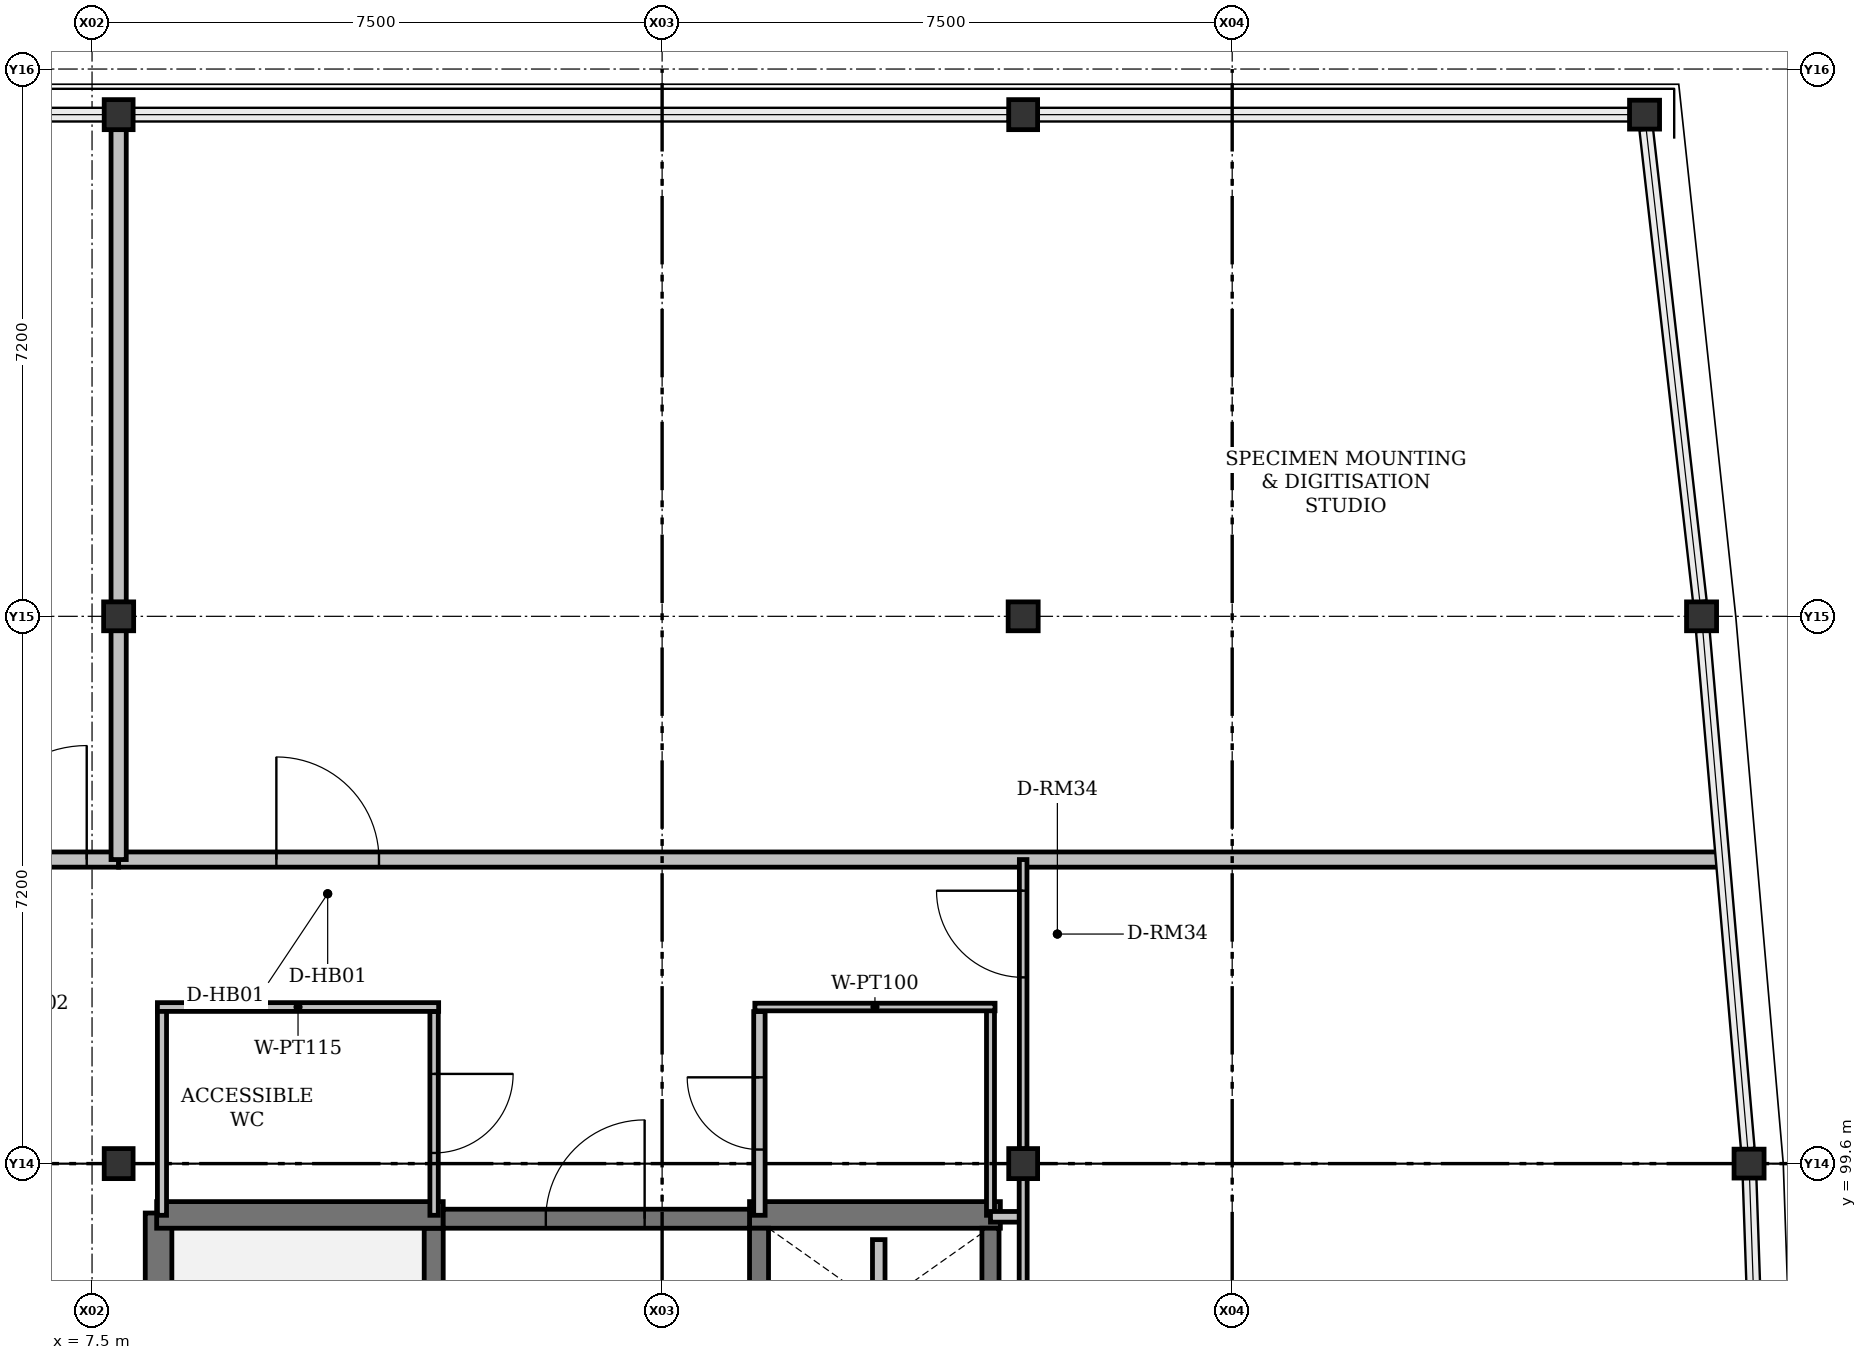
"""IFC4 building model, lengths in metres.
Left out: names, types, materials, properties, quantities, classifications, styles, units other than length and angle.
Written with IfcOpenShell. Run it as: python <this file> out.ifc"""

import sys

from ifc_helpers import new_model, si_unit, direction, frame, frame_2d, origin, origin_2d, place, context, subcontext, project, spatial, rectangle, i_section, extrude, element, fill, save


model = new_model("IFC4")
c1 = context("Model", 3, precision=1e-05, world=origin(), true_north=direction((0.0, 1.0)))
c2 = subcontext(c1, "Body", "Model", "MODEL_VIEW")
j1 = project(units=[si_unit("LENGTHUNIT", "METRE"), si_unit("PLANEANGLEUNIT", "RADIAN")], contexts=[c1])
p1 = place(None, origin())
s1 = spatial("IfcSite", under=j1, at=p1, CompositionType="ELEMENT")
p2 = place(p1, origin())
s2 = spatial("IfcBuilding", under=s1, at=p2, CompositionType="ELEMENT")
p3 = place(p2, frame((0.0, 0.0, 9.9)))
s3 = spatial("IfcBuildingStorey", under=s2, at=p3, CompositionType="ELEMENT", Elevation=9.9)
for number, where, z_axis, x_axis in (
    (1, (7.85, 99.6, 0.0), (0.0, 0.0, 1.0), (0.0, 1.0, 0.0)),
    (2, (19.75, 99.6, 0.0), (0.0, 0.0, 1.0), (0.0, 1.0, 0.0)),
    (3, (29.3, 99.6, 0.0), (0.0, 0.0, 1.0), (1.0, 0.0, 0.0)),
    (4, (7.85, 106.8, 0.0), (0.0, 0.0, 1.0), (1.0, 0.0, 0.0)),
    (5, (19.75, 106.8, 0.0), (0.0, 0.0, 1.0), (1.0, 0.0, 0.0)),
    (6, (28.675, 106.8, 0.0), (0.0, 0.0, 1.0), (1.0, 0.0, 0.0)),
    (7, (7.85, 113.4, 0.0), (0.0, 0.0, 1.0), (0.0, 1.0, 0.0)),
    (8, (19.75, 113.4, 0.0), (0.0, 0.0, 1.0), (0.0, 1.0, 0.0)),
    (9, (27.925, 113.4, 0.0), (0.0, 0.0, 1.0), (1.0, 0.0, 0.0)),
):
    element("IfcColumn", number, at=place(p3, frame(where, z_axis=z_axis, x_axis=x_axis)), inside=s3, PredefinedType="COLUMN", context=c2, shape_type="SweptSolid", body=[
        extrude(i_section(OverallWidth=0.395, OverallDepth=0.38, WebThickness=0.019, FlangeThickness=0.03, FilletRadius=0.015, at=origin_2d()), origin(), (0.0, 0.0, 1.0), 4.2),
    ])
p4 = place(p3, frame((8.375, 90.775, 0.0), z_axis=(0.0, 0.0, 1.0), x_axis=(0.0, 1.0, 0.0)))
e10 = element("IfcWall", 10, at=p4, inside=s3, PredefinedType="SHEAR", context=c2, shape_type="SweptSolid", body=[
    extrude(rectangle(XDim=8.175, YDim=0.35, at=frame_2d((4.087, 0.0))), origin(), (0.0, 0.0, 1.0), 4.2),
])
p5 = place(p3, frame((11.995, 90.9, 0.0), z_axis=(0.0, 0.0, 1.0), x_axis=(0.0, 1.0, 0.0)))
e11 = element("IfcWall", 11, at=p5, inside=s3, PredefinedType="SHEAR", context=c2, shape_type="SweptSolid", body=[
    extrude(rectangle(XDim=7.85, YDim=0.25, at=frame_2d((3.925, 0.0))), origin(), (0.0, 0.0, 1.0), 4.2),
])
p6 = place(p3, frame((8.35, 98.925, 0.0), z_axis=(0.0, 0.0, 1.0), x_axis=(1.0, 0.0, 0.0)))
e12 = element("IfcWall", 12, at=p6, inside=s3, PredefinedType="SHEAR", context=c2, shape_type="SweptSolid", body=[
    extrude(rectangle(XDim=3.77, YDim=0.35, at=frame_2d((1.885, 0.0))), origin(), (0.0, 0.0, 1.0), 4.2),
])
p7 = place(p3, frame((16.15, 98.925, 0.0), z_axis=(0.0, 0.0, 1.0), x_axis=(1.0, 0.0, 0.0)))
e13 = element("IfcWall", 13, at=p7, inside=s3, PredefinedType="SHEAR", context=c2, shape_type="SweptSolid", body=[
    extrude(rectangle(XDim=3.3, YDim=0.35, at=frame_2d((1.65, 0.0))), origin(), (0.0, 0.0, 1.0), 4.2),
])
p8 = place(p3, frame((12.12, 98.875, 0.0), z_axis=(0.0, 0.0, 1.0), x_axis=(1.0, 0.0, 0.0)))
e14 = element("IfcWall", 14, at=p8, inside=s3, PredefinedType="SHEAR", context=c2, shape_type="SweptSolid", body=[
    extrude(rectangle(XDim=4.03, YDim=0.25, at=frame_2d((2.015, 0.0))), origin(), (0.0, 0.0, 1.0), 4.2),
])
p9 = place(p8, frame((1.35, 0.0, 0.0)))
e15 = element("IfcOpeningElement", 15, at=p9, cuts=e14, PredefinedType="OPENING", context=c2, shape_type="SweptSolid", body=[
    extrude(rectangle(XDim=1.3, YDim=2.2, at=frame_2d((0.65, 1.1))), frame((0.0, 0.125, 0.0), z_axis=(0.0, -1.0, 0.0), x_axis=(1.0, 0.0, 0.0)), (0.0, 0.0, 1.0), 0.25),
])
p10 = place(p3, frame((19.32, 84.8, 0.0), z_axis=(0.0, 0.0, 1.0), x_axis=(0.0, 1.0, 0.0)))
e16 = element("IfcWall", 16, at=p10, inside=s3, PredefinedType="SHEAR", context=c2, shape_type="SweptSolid", body=[
    extrude(rectangle(XDim=13.95, YDim=0.225, at=frame_2d((6.975, 0.0))), origin(), (0.0, 0.0, 1.0), 4.2),
])
p11 = place(p3, frame((16.275, 96.575, 0.0), z_axis=(0.0, 0.0, 1.0), x_axis=(0.0, 1.0, 0.0)))
e17 = element("IfcWall", 17, at=p11, inside=s3, PredefinedType="SHEAR", context=c2, shape_type="SweptSolid", body=[
    extrude(rectangle(XDim=2.175, YDim=0.25, at=frame_2d((1.087, 0.0))), origin(), (0.0, 0.0, 1.0), 4.2),
])
p12 = place(p3, frame((17.85, 96.8, 0.0), z_axis=(0.0, 0.0, 1.0), x_axis=(0.0, 1.0, 0.0)))
e18 = element("IfcWall", 18, at=p12, inside=s3, PredefinedType="PLUMBINGWALL", context=c2, shape_type="SweptSolid", body=[
    extrude(rectangle(XDim=1.8, YDim=0.165, at=frame_2d((0.9, 0.0))), origin(), (0.0, 0.0, 1.0), 4.2),
])
p13 = place(p3, frame((8.42, 98.92, 0.0), z_axis=(0.0, 0.0, 1.0), x_axis=(0.0, 1.0, 0.0)))
e19 = element("IfcWall", 19, at=p13, inside=s3, PredefinedType="PARTITIONING", context=c2, shape_type="SweptSolid", body=[
    extrude(rectangle(XDim=2.74, YDim=0.12, at=frame_2d((1.37, 0.0))), origin(), (0.0, 0.0, 1.0), 3.466),
])
p14 = place(p3, frame((8.36, 101.66, 0.0), z_axis=(0.0, 0.0, 1.0), x_axis=(1.0, 0.0, 0.0)))
e20 = element("IfcWall", 20, at=p14, inside=s3, PredefinedType="PARTITIONING", context=c2, shape_type="SweptSolid", body=[
    extrude(rectangle(XDim=3.7, YDim=0.115, at=frame_2d((1.85, 0.0))), origin(), (0.0, 0.0, 1.0), 3.95),
])
p15 = place(p3, frame((12.0, 101.6, 0.0), z_axis=(0.0, 0.0, 1.0), x_axis=(0.0, -1.0, 0.0)))
e21 = element("IfcWall", 21, at=p15, inside=s3, PredefinedType="PARTITIONING", context=c2, shape_type="SweptSolid", body=[
    extrude(rectangle(XDim=2.68, YDim=0.11, at=frame_2d((1.34, 0.0))), origin(), (0.0, 0.0, 1.0), 3.466),
])
p16 = place(p15, frame((0.82, 0.0, 0.0)))
e22 = element("IfcOpeningElement", 22, at=p16, cuts=e21, PredefinedType="OPENING", context=c2, shape_type="SweptSolid", body=[
    extrude(rectangle(XDim=1.04, YDim=2.15, at=frame_2d((0.52, 1.075))), frame((0.0, 0.055, 0.0), z_axis=(0.0, -1.0, 0.0), x_axis=(1.0, 0.0, 0.0)), (0.0, 0.0, 1.0), 0.11),
])
p17 = place(p3, frame((19.32, 98.92, 0.0), z_axis=(0.0, 0.0, 1.0), x_axis=(0.0, 1.0, 0.0)))
e23 = element("IfcWall", 23, at=p17, inside=s3, PredefinedType="PARTITIONING", context=c2, shape_type="SweptSolid", body=[
    extrude(rectangle(XDim=2.74, YDim=0.105, at=frame_2d((1.37, 0.0))), origin(), (0.0, 0.0, 1.0), 3.466),
])
p18 = place(p3, frame((19.38, 101.66, 0.0), z_axis=(0.0, 0.0, 1.0), x_axis=(-1.0, 0.0, 0.0)))
e24 = element("IfcWall", 24, at=p18, inside=s3, PredefinedType="PARTITIONING", context=c2, shape_type="SweptSolid", body=[
    extrude(rectangle(XDim=3.16, YDim=0.1, at=frame_2d((1.58, 0.0))), origin(), (0.0, 0.0, 1.0), 3.95),
])
p19 = place(p3, frame((16.28, 98.92, 0.0), z_axis=(0.0, 0.0, 1.0), x_axis=(0.0, 1.0, 0.0)))
e25 = element("IfcWall", 25, at=p19, inside=s3, PredefinedType="PARTITIONING", context=c2, shape_type="SweptSolid", body=[
    extrude(rectangle(XDim=2.68, YDim=0.15, at=frame_2d((1.34, 0.0))), origin(), (0.0, 0.0, 1.0), 3.466),
])
p20 = place(p19, frame((0.865, 0.0, 0.0)))
e26 = element("IfcOpeningElement", 26, at=p20, cuts=e25, PredefinedType="OPENING", context=c2, shape_type="SweptSolid", body=[
    extrude(rectangle(XDim=0.95, YDim=2.2, at=frame_2d((0.475, 1.1))), frame((0.0, 0.075, 0.0), z_axis=(0.0, -1.0, 0.0), x_axis=(1.0, 0.0, 0.0)), (0.0, 0.0, 1.0), 0.15),
])
p21 = place(p3, frame((19.75, 98.9, 0.0), z_axis=(0.0, 0.0, 1.0), x_axis=(-1.0, 0.0, 0.0)))
e27 = element("IfcWall", 27, at=p21, inside=s3, PredefinedType="PARTITIONING", context=c2, shape_type="SweptSolid", body=[
    extrude(rectangle(XDim=0.43, YDim=0.14, at=frame_2d((0.215, 0.0))), origin(), (0.0, 0.0, 1.0), 3.542),
])
p22 = place(p3, frame((0.65, 103.6, 0.0), z_axis=(0.0, 0.0, 1.0), x_axis=(1.0, 0.0, 0.0)))
e28 = element("IfcWall", 28, at=p22, inside=s3, PredefinedType="SOLIDWALL", context=c2, shape_type="SweptSolid", body=[
    extrude(rectangle(XDim=7.2, YDim=0.2, at=frame_2d((3.6, 0.0))), origin(), (0.0, 0.0, 1.0), 3.542),
])
p23 = place(p22, frame((5.28, 0.0, 0.0)))
e29 = element("IfcOpeningElement", 29, at=p23, cuts=e28, PredefinedType="OPENING", context=c2, shape_type="SweptSolid", body=[
    extrude(rectangle(XDim=1.5, YDim=2.3, at=frame_2d((0.75, 1.15))), frame((0.0, 0.1, 0.0), z_axis=(0.0, -1.0, 0.0), x_axis=(1.0, 0.0, 0.0)), (0.0, 0.0, 1.0), 0.2),
])
p24 = place(p3, frame((7.85, 103.6, 0.0), z_axis=(0.0, 0.0, 1.0), x_axis=(1.0, 0.0, 0.0)))
e30 = element("IfcWall", 30, at=p24, inside=s3, PredefinedType="SOLIDWALL", context=c2, shape_type="SweptSolid", body=[
    extrude(rectangle(XDim=21.065, YDim=0.2, at=frame_2d((10.532, 0.0))), origin(), (0.0, 0.0, 1.0), 3.542),
])
p25 = place(p24, frame((2.075, 0.0, 0.0)))
e31 = element("IfcOpeningElement", 31, at=p25, cuts=e30, PredefinedType="OPENING", context=c2, shape_type="SweptSolid", body=[
    extrude(rectangle(XDim=1.35, YDim=2.25, at=frame_2d((0.675, 1.125))), frame((0.0, 0.1, 0.0), z_axis=(0.0, -1.0, 0.0), x_axis=(1.0, 0.0, 0.0)), (0.0, 0.0, 1.0), 0.2),
])
p26 = place(p3, frame((7.85, 106.615, 0.0), z_axis=(0.0, 0.0, 1.0), x_axis=(0.0, -1.0, 0.0)))
e32 = element("IfcWall", 32, at=p26, inside=s3, PredefinedType="SOLIDWALL", context=c2, shape_type="SweptSolid", body=[
    extrude(rectangle(XDim=3.015, YDim=0.2, at=frame_2d((1.507, 0.0))), origin(), (0.0, 0.0, 1.0), 3.542),
])
p27 = place(p3, frame((7.85, 113.35, 0.0), z_axis=(0.0, 0.0, 1.0), x_axis=(0.0, -1.0, 0.0)))
e33 = element("IfcWall", 33, at=p27, inside=s3, PredefinedType="SOLIDWALL", context=c2, shape_type="SweptSolid", body=[
    extrude(rectangle(XDim=6.365, YDim=0.2, at=frame_2d((3.183, 0.0))), origin(), (0.0, 0.0, 1.0), 3.542),
])
p28 = place(p3, frame((19.75, 92.585, 0.0), z_axis=(0.0, 0.0, 1.0), x_axis=(0.0, 1.0, 0.0)))
e34 = element("IfcWall", 34, at=p28, inside=s3, PredefinedType="PARTITIONING", context=c2, shape_type="SweptSolid", body=[
    extrude(rectangle(XDim=6.823, YDim=0.105, at=frame_2d((3.411, 0.0))), origin(), (0.0, 0.0, 1.0), 3.542),
])
p29 = place(p3, frame((19.75, 99.792, 0.0), z_axis=(0.0, 0.0, 1.0), x_axis=(0.0, 1.0, 0.0)))
e35 = element("IfcWall", 35, at=p29, inside=s3, PredefinedType="PARTITIONING", context=c2, shape_type="SweptSolid", body=[
    extrude(rectangle(XDim=3.808, YDim=0.1, at=frame_2d((1.904, 0.0))), origin(), (0.0, 0.0, 1.0), 3.542),
])
p30 = place(p29, frame((2.258, 0.0, 0.0)))
e36 = element("IfcOpeningElement", 36, at=p30, cuts=e35, PredefinedType="OPENING", context=c2, shape_type="SweptSolid", body=[
    extrude(rectangle(XDim=1.14, YDim=2.18, at=frame_2d((0.57, 1.09))), frame((0.0, 0.05, 0.0), z_axis=(0.0, -1.0, 0.0), x_axis=(1.0, 0.0, 0.0)), (0.0, 0.0, 1.0), 0.1),
])
p31 = place(p9, origin())
e37 = element("IfcDoor", 37, at=p31, inside=s3, OperationType="SINGLE_SWING_RIGHT", PredefinedType="DOOR", context=c2, shape_type="SweptSolid", body=[
    extrude(rectangle(XDim=1.3, YDim=2.2, at=frame_2d((0.65, 1.1))), frame((0.0, 0.025, 0.0), z_axis=(0.0, -1.0, 0.0), x_axis=(1.0, 0.0, 0.0)), (0.0, 0.0, 1.0), 0.05),
])
fill(e15, e37)
p32 = place(p16, origin())
e38 = element("IfcDoor", 38, at=p32, inside=s3, OperationType="SINGLE_SWING_LEFT", PredefinedType="DOOR", context=c2, shape_type="SweptSolid", body=[
    extrude(rectangle(XDim=1.04, YDim=2.15, at=frame_2d((0.52, 1.075))), frame((0.0, 0.025, 0.0), z_axis=(0.0, -1.0, 0.0), x_axis=(1.0, 0.0, 0.0)), (0.0, 0.0, 1.0), 0.05),
])
fill(e22, e38)
p33 = place(p20, origin())
e39 = element("IfcDoor", 39, at=p33, inside=s3, OperationType="SINGLE_SWING_RIGHT", PredefinedType="DOOR", context=c2, shape_type="SweptSolid", body=[
    extrude(rectangle(XDim=0.95, YDim=2.2, at=frame_2d((0.475, 1.1))), frame((0.0, 0.025, 0.0), z_axis=(0.0, -1.0, 0.0), x_axis=(1.0, 0.0, 0.0)), (0.0, 0.0, 1.0), 0.05),
])
fill(e26, e39)
p34 = place(p23, origin())
e40 = element("IfcDoor", 40, at=p34, inside=s3, OperationType="SINGLE_SWING_RIGHT", PredefinedType="DOOR", context=c2, shape_type="SweptSolid", body=[
    extrude(rectangle(XDim=1.5, YDim=2.3, at=frame_2d((0.75, 1.15))), frame((0.0, 0.025, 0.0), z_axis=(0.0, -1.0, 0.0), x_axis=(1.0, 0.0, 0.0)), (0.0, 0.0, 1.0), 0.05),
])
fill(e29, e40)
p35 = place(p25, origin())
e41 = element("IfcDoor", 41, at=p35, inside=s3, OperationType="SINGLE_SWING_LEFT", PredefinedType="DOOR", context=c2, shape_type="SweptSolid", body=[
    extrude(rectangle(XDim=1.35, YDim=2.25, at=frame_2d((0.675, 1.125))), frame((0.0, 0.025, 0.0), z_axis=(0.0, -1.0, 0.0), x_axis=(1.0, 0.0, 0.0)), (0.0, 0.0, 1.0), 0.05),
])
fill(e31, e41)
p36 = place(p30, origin())
e42 = element("IfcDoor", 42, at=p36, inside=s3, OperationType="SINGLE_SWING_RIGHT", PredefinedType="DOOR", context=c2, shape_type="SweptSolid", body=[
    extrude(rectangle(XDim=1.14, YDim=2.18, at=frame_2d((0.57, 1.09))), frame((0.0, 0.025, 0.0), z_axis=(0.0, -1.0, 0.0), x_axis=(1.0, 0.0, 0.0)), (0.0, 0.0, 1.0), 0.05),
])
fill(e36, e42)
save(model, sys.argv[1])
